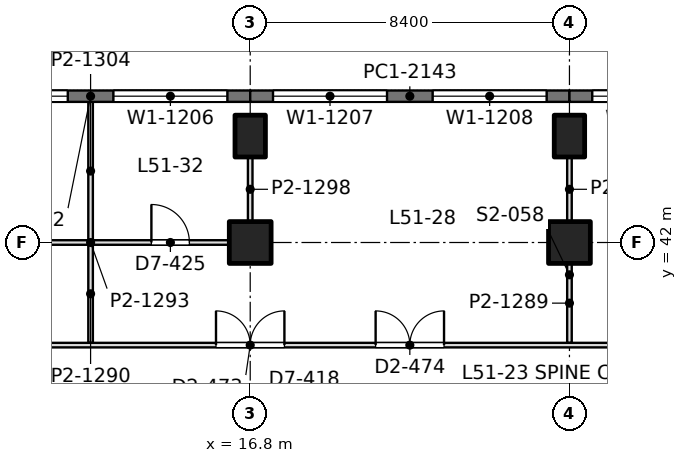
"""IFC4 building model, lengths in metres.
Left out: names, types, materials, properties, quantities, classifications, styles, units other than length and angle.
Written with IfcOpenShell. Run it as: python <this file> out.ifc"""

import sys

from ifc_helpers import new_model, si_unit, direction, frame, frame_2d, origin, origin_2d, place, context, subcontext, project, spatial, rectangle, extrude, element, fill, save


model = new_model("IFC4")
c1 = context("Model", 3, precision=1e-05, world=origin(), true_north=direction((0.0, 1.0)))
c2 = subcontext(c1, "Body", "Model", "MODEL_VIEW")
j1 = project(units=[si_unit("LENGTHUNIT", "METRE"), si_unit("PLANEANGLEUNIT", "RADIAN")], contexts=[c1])
p1 = place(None, origin())
s1 = spatial("IfcSite", under=j1, at=p1, CompositionType="ELEMENT")
p2 = place(p1, origin())
s2 = spatial("IfcBuilding", under=s1, at=p2, CompositionType="ELEMENT")
p3 = place(p2, frame((0.0, 0.0, 223.8)))
s3 = spatial("IfcBuildingStorey", under=s2, at=p3, CompositionType="ELEMENT", Elevation=223.8)
p4 = place(p3, frame((16.8, 42.0, 0.0), z_axis=(0.0, 0.0, 1.0), x_axis=(1.0, 0.0, 0.0)))
e1 = element("IfcColumn", 1, at=p4, inside=s3, PredefinedType="COLUMN", context=c2, shape_type="SweptSolid", body=[
    extrude(rectangle(XDim=1.1, YDim=1.1, at=origin_2d()), origin(), (0.0, 0.0, 1.0), 4.2),
])
p5 = place(p3, frame((16.8, 44.8, 0.0), z_axis=(0.0, 0.0, 1.0), x_axis=(1.0, 0.0, 0.0)))
e2 = element("IfcColumn", 2, at=p5, inside=s3, PredefinedType="COLUMN", context=c2, shape_type="SweptSolid", body=[
    extrude(rectangle(XDim=0.8, YDim=1.1, at=origin_2d()), origin(), (0.0, 0.0, 1.0), 4.2),
])
p6 = place(p3, frame((25.2, 42.0, 0.0), z_axis=(0.0, 0.0, 1.0), x_axis=(1.0, 0.0, 0.0)))
e3 = element("IfcColumn", 3, at=p6, inside=s3, PredefinedType="COLUMN", context=c2, shape_type="SweptSolid", body=[
    extrude(rectangle(XDim=1.1, YDim=1.1, at=origin_2d()), origin(), (0.0, 0.0, 1.0), 4.2),
])
p7 = place(p3, frame((25.2, 44.8, 0.0), z_axis=(0.0, 0.0, 1.0), x_axis=(1.0, 0.0, 0.0)))
e4 = element("IfcColumn", 4, at=p7, inside=s3, PredefinedType="COLUMN", context=c2, shape_type="SweptSolid", body=[
    extrude(rectangle(XDim=0.8, YDim=1.1, at=origin_2d()), origin(), (0.0, 0.0, 1.0), 4.2),
])
p8 = place(p3, frame((8.4, 45.85, 0.0), z_axis=(0.0, 0.0, 1.0), x_axis=(1.0, 0.0, 0.0)))
e5 = element("IfcWall", 5, at=p8, inside=s3, PredefinedType="SOLIDWALL", context=c2, shape_type="SweptSolid", body=[
    extrude(rectangle(XDim=8.4, YDim=0.3, at=frame_2d((4.2, 0.0))), origin(), (0.0, 0.0, 1.0), 4.05),
])
p9 = place(p8, frame((0.6, 0.0, 0.9)))
e6 = element("IfcOpeningElement", 6, at=p9, cuts=e5, PredefinedType="OPENING", context=c2, shape_type="SweptSolid", body=[
    extrude(rectangle(XDim=3.0, YDim=1.9, at=frame_2d((1.5, 0.95))), frame((0.0, 0.16, 0.0), z_axis=(0.0, -1.0, 0.0), x_axis=(1.0, 0.0, 0.0)), (0.0, 0.0, 1.0), 0.32),
])
p10 = place(p8, frame((4.8, 0.0, 0.9)))
e7 = element("IfcOpeningElement", 7, at=p10, cuts=e5, PredefinedType="OPENING", context=c2, shape_type="SweptSolid", body=[
    extrude(rectangle(XDim=3.0, YDim=1.9, at=frame_2d((1.5, 0.95))), frame((0.0, 0.16, 0.0), z_axis=(0.0, -1.0, 0.0), x_axis=(1.0, 0.0, 0.0)), (0.0, 0.0, 1.0), 0.32),
])
p11 = place(p3, frame((16.8, 45.85, 0.0), z_axis=(0.0, 0.0, 1.0), x_axis=(1.0, 0.0, 0.0)))
e8 = element("IfcWall", 8, at=p11, inside=s3, PredefinedType="SOLIDWALL", context=c2, shape_type="SweptSolid", body=[
    extrude(rectangle(XDim=8.4, YDim=0.3, at=frame_2d((4.2, 0.0))), origin(), (0.0, 0.0, 1.0), 4.05),
])
p12 = place(p11, frame((0.6, 0.0, 0.9)))
e9 = element("IfcOpeningElement", 9, at=p12, cuts=e8, PredefinedType="OPENING", context=c2, shape_type="SweptSolid", body=[
    extrude(rectangle(XDim=3.0, YDim=1.9, at=frame_2d((1.5, 0.95))), frame((0.0, 0.16, 0.0), z_axis=(0.0, -1.0, 0.0), x_axis=(1.0, 0.0, 0.0)), (0.0, 0.0, 1.0), 0.32),
])
p13 = place(p11, frame((4.8, 0.0, 0.9)))
e10 = element("IfcOpeningElement", 10, at=p13, cuts=e8, PredefinedType="OPENING", context=c2, shape_type="SweptSolid", body=[
    extrude(rectangle(XDim=3.0, YDim=1.9, at=frame_2d((1.5, 0.95))), frame((0.0, 0.16, 0.0), z_axis=(0.0, -1.0, 0.0), x_axis=(1.0, 0.0, 0.0)), (0.0, 0.0, 1.0), 0.32),
])
p14 = place(p3, frame((25.2, 45.85, 0.0), z_axis=(0.0, 0.0, 1.0), x_axis=(1.0, 0.0, 0.0)))
e11 = element("IfcWall", 11, at=p14, inside=s3, PredefinedType="SOLIDWALL", context=c2, shape_type="SweptSolid", body=[
    extrude(rectangle(XDim=8.4, YDim=0.3, at=frame_2d((4.2, 0.0))), origin(), (0.0, 0.0, 1.0), 4.05),
])
p15 = place(p14, frame((0.6, 0.0, 0.9)))
e12 = element("IfcOpeningElement", 12, at=p15, cuts=e11, PredefinedType="OPENING", context=c2, shape_type="SweptSolid", body=[
    extrude(rectangle(XDim=3.0, YDim=1.9, at=frame_2d((1.5, 0.95))), frame((0.0, 0.16, 0.0), z_axis=(0.0, -1.0, 0.0), x_axis=(1.0, 0.0, 0.0)), (0.0, 0.0, 1.0), 0.32),
])
p16 = place(p14, frame((4.8, 0.0, 0.9)))
e13 = element("IfcOpeningElement", 13, at=p16, cuts=e11, PredefinedType="OPENING", context=c2, shape_type="SweptSolid", body=[
    extrude(rectangle(XDim=3.0, YDim=1.9, at=frame_2d((1.5, 0.95))), frame((0.0, 0.16, 0.0), z_axis=(0.0, -1.0, 0.0), x_axis=(1.0, 0.0, 0.0)), (0.0, 0.0, 1.0), 0.32),
])
p17 = place(p3, frame((8.949, 42.0, 0.0), z_axis=(0.0, 0.0, 1.0), x_axis=(1.0, 0.0, 0.0)))
e14 = element("IfcWall", 14, at=p17, inside=s3, PredefinedType="PARTITIONING", context=c2, shape_type="SweptSolid", body=[
    extrude(rectangle(XDim=7.302, YDim=0.12, at=frame_2d((3.651, 0.0))), origin(), (0.0, 0.0, 1.0), 3.55),
])
p18 = place(p17, frame((1.051, 0.0, 0.0)))
e15 = element("IfcOpeningElement", 15, at=p18, cuts=e14, PredefinedType="OPENING", context=c2, shape_type="SweptSolid", body=[
    extrude(rectangle(XDim=1.0, YDim=2.4, at=frame_2d((0.5, 1.2))), frame((0.0, 0.07, 0.0), z_axis=(0.0, -1.0, 0.0), x_axis=(1.0, 0.0, 0.0)), (0.0, 0.0, 1.0), 0.14),
])
p19 = place(p17, frame((5.251, 0.0, 0.0)))
e16 = element("IfcOpeningElement", 16, at=p19, cuts=e14, PredefinedType="OPENING", context=c2, shape_type="SweptSolid", body=[
    extrude(rectangle(XDim=1.0, YDim=2.4, at=frame_2d((0.5, 1.2))), frame((0.0, 0.07, 0.0), z_axis=(0.0, -1.0, 0.0), x_axis=(1.0, 0.0, 0.0)), (0.0, 0.0, 1.0), 0.14),
])
p20 = place(p3, frame((12.6, 42.058, 0.0), z_axis=(0.0, 0.0, 1.0), x_axis=(0.0, 1.0, 0.0)))
e17 = element("IfcWall", 17, at=p20, inside=s3, PredefinedType="PARTITIONING", context=c2, shape_type="SweptSolid", body=[
    extrude(rectangle(XDim=3.644, YDim=0.12, at=frame_2d((1.822, 0.0))), origin(), (0.0, 0.0, 1.0), 3.55),
])
p21 = place(p3, frame((16.8, 42.549, 0.0), z_axis=(0.0, 0.0, 1.0), x_axis=(0.0, 1.0, 0.0)))
e18 = element("IfcWall", 18, at=p21, inside=s3, PredefinedType="PARTITIONING", context=c2, shape_type="SweptSolid", body=[
    extrude(rectangle(XDim=1.702, YDim=0.12, at=frame_2d((0.851, 0.0))), origin(), (0.0, 0.0, 1.0), 3.69),
])
p22 = place(p3, frame((12.6, 39.358, 0.0), z_axis=(0.0, 0.0, 1.0), x_axis=(0.0, 1.0, 0.0)))
e19 = element("IfcWall", 19, at=p22, inside=s3, PredefinedType="PARTITIONING", context=c2, shape_type="SweptSolid", body=[
    extrude(rectangle(XDim=2.584, YDim=0.12, at=frame_2d((1.292, 0.0))), origin(), (0.0, 0.0, 1.0), 3.55),
])
p23 = place(p3, frame((25.2, 39.358, 0.0), z_axis=(0.0, 0.0, 1.0), x_axis=(0.0, 1.0, 0.0)))
e20 = element("IfcWall", 20, at=p23, inside=s3, PredefinedType="PARTITIONING", context=c2, shape_type="SweptSolid", body=[
    extrude(rectangle(XDim=2.093, YDim=0.12, at=frame_2d((1.046, 0.0))), origin(), (0.0, 0.0, 1.0), 3.55),
])
p24 = place(p3, frame((25.2, 42.549, 0.0), z_axis=(0.0, 0.0, 1.0), x_axis=(0.0, 1.0, 0.0)))
e21 = element("IfcWall", 21, at=p24, inside=s3, PredefinedType="PARTITIONING", context=c2, shape_type="SweptSolid", body=[
    extrude(rectangle(XDim=1.702, YDim=0.12, at=frame_2d((0.851, 0.0))), origin(), (0.0, 0.0, 1.0), 3.69),
])
p25 = place(p3, frame((7.748, 39.3, 0.0), z_axis=(0.0, 0.0, 1.0), x_axis=(1.0, 0.0, 0.0)))
e22 = element("IfcWall", 22, at=p25, inside=s3, PredefinedType="PARTITIONING", context=c2, shape_type="SweptSolid", body=[
    extrude(rectangle(XDim=41.452, YDim=0.12, at=frame_2d((20.726, 0.0))), origin(), (0.0, 0.0, 1.0), 3.55),
])
p26 = place(p25, frame((1.527, 0.0, 0.0)))
e23 = element("IfcOpeningElement", 23, at=p26, cuts=e22, PredefinedType="OPENING", context=c2, shape_type="SweptSolid", body=[
    extrude(rectangle(XDim=1.8, YDim=2.2, at=frame_2d((0.9, 1.1))), frame((0.0, 0.07, 0.0), z_axis=(0.0, -1.0, 0.0), x_axis=(1.0, 0.0, 0.0)), (0.0, 0.0, 1.0), 0.14),
])
p27 = place(p25, frame((8.152, 0.0, 0.0)))
e24 = element("IfcOpeningElement", 24, at=p27, cuts=e22, PredefinedType="OPENING", context=c2, shape_type="SweptSolid", body=[
    extrude(rectangle(XDim=1.8, YDim=2.2, at=frame_2d((0.9, 1.1))), frame((0.0, 0.07, 0.0), z_axis=(0.0, -1.0, 0.0), x_axis=(1.0, 0.0, 0.0)), (0.0, 0.0, 1.0), 0.14),
])
p28 = place(p25, frame((12.352, 0.0, 0.0)))
e25 = element("IfcOpeningElement", 25, at=p28, cuts=e22, PredefinedType="OPENING", context=c2, shape_type="SweptSolid", body=[
    extrude(rectangle(XDim=1.8, YDim=2.2, at=frame_2d((0.9, 1.1))), frame((0.0, 0.07, 0.0), z_axis=(0.0, -1.0, 0.0), x_axis=(1.0, 0.0, 0.0)), (0.0, 0.0, 1.0), 0.14),
])
p29 = place(p25, frame((20.752, 0.0, 0.0)))
e26 = element("IfcOpeningElement", 26, at=p29, cuts=e22, PredefinedType="OPENING", context=c2, shape_type="SweptSolid", body=[
    extrude(rectangle(XDim=1.8, YDim=2.2, at=frame_2d((0.9, 1.1))), frame((0.0, 0.07, 0.0), z_axis=(0.0, -1.0, 0.0), x_axis=(1.0, 0.0, 0.0)), (0.0, 0.0, 1.0), 0.14),
])
p30 = place(p25, frame((24.952, 0.0, 0.0)))
e27 = element("IfcOpeningElement", 27, at=p30, cuts=e22, PredefinedType="OPENING", context=c2, shape_type="SweptSolid", body=[
    extrude(rectangle(XDim=1.8, YDim=2.2, at=frame_2d((0.9, 1.1))), frame((0.0, 0.07, 0.0), z_axis=(0.0, -1.0, 0.0), x_axis=(1.0, 0.0, 0.0)), (0.0, 0.0, 1.0), 0.14),
])
p31 = place(p25, frame((32.952, 0.0, 0.0)))
e28 = element("IfcOpeningElement", 28, at=p31, cuts=e22, PredefinedType="OPENING", context=c2, shape_type="SweptSolid", body=[
    extrude(rectangle(XDim=1.8, YDim=2.2, at=frame_2d((0.9, 1.1))), frame((0.0, 0.07, 0.0), z_axis=(0.0, -1.0, 0.0), x_axis=(1.0, 0.0, 0.0)), (0.0, 0.0, 1.0), 0.14),
])
p32 = place(p25, frame((36.752, 0.0, 0.0)))
e29 = element("IfcOpeningElement", 29, at=p32, cuts=e22, PredefinedType="OPENING", context=c2, shape_type="SweptSolid", body=[
    extrude(rectangle(XDim=1.8, YDim=2.2, at=frame_2d((0.9, 1.1))), frame((0.0, 0.07, 0.0), z_axis=(0.0, -1.0, 0.0), x_axis=(1.0, 0.0, 0.0)), (0.0, 0.0, 1.0), 0.14),
])
p33 = place(p9, origin())
e30 = element("IfcWindow", 30, at=p33, inside=s3, PartitioningType="SINGLE_PANEL", PredefinedType="WINDOW", context=c2, shape_type="SweptSolid", body=[
    extrude(rectangle(XDim=3.0, YDim=1.9, at=frame_2d((1.5, 0.95))), frame((0.0, 0.03, 0.0), z_axis=(0.0, -1.0, 0.0), x_axis=(1.0, 0.0, 0.0)), (0.0, 0.0, 1.0), 0.06),
])
fill(e6, e30)
p34 = place(p10, origin())
e31 = element("IfcWindow", 31, at=p34, inside=s3, PartitioningType="SINGLE_PANEL", PredefinedType="WINDOW", context=c2, shape_type="SweptSolid", body=[
    extrude(rectangle(XDim=3.0, YDim=1.9, at=frame_2d((1.5, 0.95))), frame((0.0, 0.03, 0.0), z_axis=(0.0, -1.0, 0.0), x_axis=(1.0, 0.0, 0.0)), (0.0, 0.0, 1.0), 0.06),
])
fill(e7, e31)
p35 = place(p12, origin())
e32 = element("IfcWindow", 32, at=p35, inside=s3, PartitioningType="SINGLE_PANEL", PredefinedType="WINDOW", context=c2, shape_type="SweptSolid", body=[
    extrude(rectangle(XDim=3.0, YDim=1.9, at=frame_2d((1.5, 0.95))), frame((0.0, 0.03, 0.0), z_axis=(0.0, -1.0, 0.0), x_axis=(1.0, 0.0, 0.0)), (0.0, 0.0, 1.0), 0.06),
])
fill(e9, e32)
p36 = place(p13, origin())
e33 = element("IfcWindow", 33, at=p36, inside=s3, PartitioningType="SINGLE_PANEL", PredefinedType="WINDOW", context=c2, shape_type="SweptSolid", body=[
    extrude(rectangle(XDim=3.0, YDim=1.9, at=frame_2d((1.5, 0.95))), frame((0.0, 0.03, 0.0), z_axis=(0.0, -1.0, 0.0), x_axis=(1.0, 0.0, 0.0)), (0.0, 0.0, 1.0), 0.06),
])
fill(e10, e33)
p37 = place(p15, origin())
e34 = element("IfcWindow", 34, at=p37, inside=s3, PartitioningType="SINGLE_PANEL", PredefinedType="WINDOW", context=c2, shape_type="SweptSolid", body=[
    extrude(rectangle(XDim=3.0, YDim=1.9, at=frame_2d((1.5, 0.95))), frame((0.0, 0.03, 0.0), z_axis=(0.0, -1.0, 0.0), x_axis=(1.0, 0.0, 0.0)), (0.0, 0.0, 1.0), 0.06),
])
fill(e12, e34)
p38 = place(p19, origin())
e35 = element("IfcDoor", 35, at=p38, inside=s3, OperationType="SINGLE_SWING_LEFT", PredefinedType="DOOR", context=c2, shape_type="SweptSolid", body=[
    extrude(rectangle(XDim=1.0, YDim=2.4, at=frame_2d((0.5, 1.2))), frame((0.0, 0.025, 0.0), z_axis=(0.0, -1.0, 0.0), x_axis=(1.0, 0.0, 0.0)), (0.0, 0.0, 1.0), 0.05),
])
fill(e16, e35)
p39 = place(p27, origin())
e36 = element("IfcDoor", 36, at=p39, inside=s3, OperationType="DOUBLE_DOOR_SINGLE_SWING", PredefinedType="DOOR", context=c2, shape_type="SweptSolid", body=[
    extrude(rectangle(XDim=1.8, YDim=2.2, at=frame_2d((0.9, 1.1))), frame((0.0, 0.025, 0.0), z_axis=(0.0, -1.0, 0.0), x_axis=(1.0, 0.0, 0.0)), (0.0, 0.0, 1.0), 0.05),
])
fill(e24, e36)
p40 = place(p28, origin())
e37 = element("IfcDoor", 37, at=p40, inside=s3, OperationType="DOUBLE_DOOR_SINGLE_SWING", PredefinedType="DOOR", context=c2, shape_type="SweptSolid", body=[
    extrude(rectangle(XDim=1.8, YDim=2.2, at=frame_2d((0.9, 1.1))), frame((0.0, 0.025, 0.0), z_axis=(0.0, -1.0, 0.0), x_axis=(1.0, 0.0, 0.0)), (0.0, 0.0, 1.0), 0.05),
])
fill(e25, e37)
save(model, sys.argv[1])
